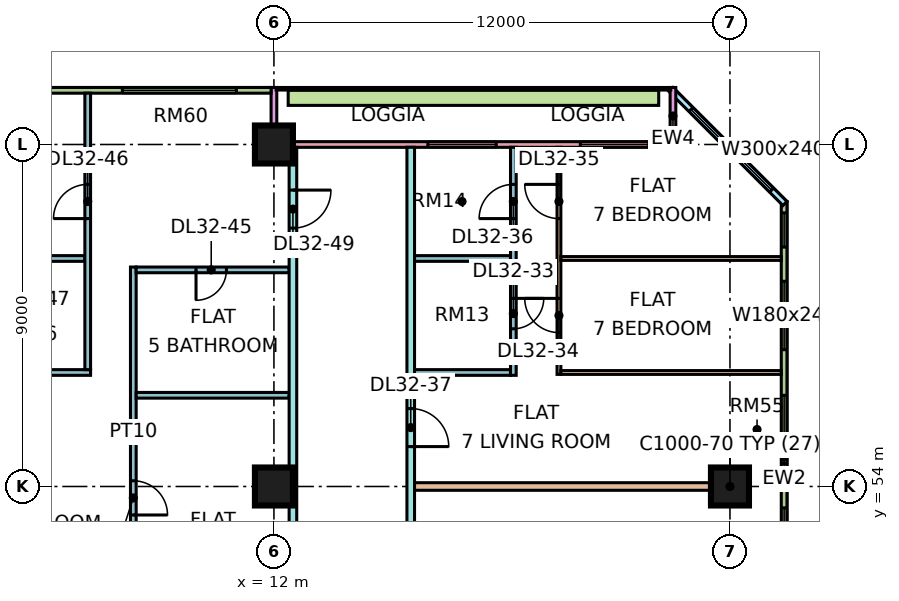
"""IFC4 building model, lengths in metres.
Left out: names, types, materials, properties, quantities, classifications, styles, units other than length and angle.
Written with IfcOpenShell. Run it as: python <this file> out.ifc"""

import sys

from ifc_helpers import new_model, si_unit, direction, frame, frame_2d, origin, origin_2d, place, context, subcontext, project, spatial, rectangle, extrude, element, fill, save


model = new_model("IFC4")
c1 = context("Model", 3, precision=1e-05, world=origin(), true_north=direction((0.0, 1.0)))
c2 = subcontext(c1, "Body", "Model", "MODEL_VIEW")
j1 = project(units=[si_unit("LENGTHUNIT", "METRE"), si_unit("PLANEANGLEUNIT", "RADIAN")], contexts=[c1])
p1 = place(None, origin())
s1 = spatial("IfcSite", under=j1, at=p1, CompositionType="ELEMENT")
p2 = place(p1, origin())
s2 = spatial("IfcBuilding", under=s1, at=p2, CompositionType="ELEMENT")
p3 = place(p2, frame((0.0, 0.0, 136.9)))
s3 = spatial("IfcBuildingStorey", under=s2, at=p3, CompositionType="ELEMENT", Elevation=136.9)
for number, where, z_axis, x_axis in (
    (1, (12.0, 54.0, 0.0), (0.0, 0.0, 1.0), (1.0, 0.0, 0.0)),
    (2, (12.0, 63.0, 0.0), (0.0, 0.0, 1.0), (1.0, 0.0, 0.0)),
    (3, (24.0, 54.0, 0.0), (0.0, 0.0, 1.0), (1.0, 0.0, 0.0)),
):
    element("IfcColumn", number, at=place(p3, frame(where, z_axis=z_axis, x_axis=x_axis)), inside=s3, PredefinedType="COLUMN", context=c2, shape_type="SweptSolid", body=[
        extrude(rectangle(XDim=1.0, YDim=1.0, at=origin_2d()), origin(), (0.0, 0.0, 1.0), 3.75),
    ])
p4 = place(p3, frame((25.425, 48.075, 0.0), z_axis=(0.0, 0.0, 1.0), x_axis=(0.0, 1.0, 0.0)))
e4 = element("IfcWall", 4, at=p4, inside=s3, PredefinedType="SOLIDWALL", context=c2, shape_type="SweptSolid", body=[
    extrude(rectangle(XDim=13.425, YDim=0.15, at=frame_2d((6.712, 0.0))), origin(), (0.0, 0.0, 1.0), 3.3),
])
p5 = place(p4, frame((0.562, 0.0, 0.45)))
e5 = element("IfcOpeningElement", 5, at=p5, cuts=e4, PredefinedType="OPENING", context=c2, shape_type="SweptSolid", body=[
    extrude(rectangle(XDim=4.8, YDim=2.4, at=frame_2d((2.4, 1.2))), frame((0.0, 0.085, 0.0), z_axis=(0.0, -1.0, 0.0), x_axis=(1.0, 0.0, 0.0)), (0.0, 0.0, 1.0), 0.17),
])
p6 = place(p4, frame((6.525, 0.0, 0.45)))
e6 = element("IfcOpeningElement", 6, at=p6, cuts=e4, PredefinedType="OPENING", context=c2, shape_type="SweptSolid", body=[
    extrude(rectangle(XDim=1.8, YDim=2.4, at=frame_2d((0.9, 1.2))), frame((0.0, 0.085, 0.0), z_axis=(0.0, -1.0, 0.0), x_axis=(1.0, 0.0, 0.0)), (0.0, 0.0, 1.0), 0.17),
])
p7 = place(p4, frame((9.525, 0.0, 0.45)))
e7 = element("IfcOpeningElement", 7, at=p7, cuts=e4, PredefinedType="OPENING", context=c2, shape_type="SweptSolid", body=[
    extrude(rectangle(XDim=1.8, YDim=2.4, at=frame_2d((0.9, 1.2))), frame((0.0, 0.085, 0.0), z_axis=(0.0, -1.0, 0.0), x_axis=(1.0, 0.0, 0.0)), (0.0, 0.0, 1.0), 0.17),
])
p8 = place(p4, frame((12.225, 0.0, 0.45)))
e8 = element("IfcOpeningElement", 8, at=p8, cuts=e4, PredefinedType="OPENING", context=c2, shape_type="SweptSolid", body=[
    extrude(rectangle(XDim=0.9, YDim=2.4, at=frame_2d((0.45, 1.2))), frame((0.0, 0.085, 0.0), z_axis=(0.0, -1.0, 0.0), x_axis=(1.0, 0.0, 0.0)), (0.0, 0.0, 1.0), 0.17),
])
p9 = place(p3, frame((25.447, 61.447, 0.0), z_axis=(0.0, 0.0, 1.0), x_axis=(-0.707106781187, 0.707106781187, 0.0)))
e9 = element("IfcWall", 9, at=p9, inside=s3, PredefinedType="SOLIDWALL", context=c2, shape_type="SweptSolid", body=[
    extrude(rectangle(XDim=4.243, YDim=0.15, at=frame_2d((2.121, 0.0))), origin(), (0.0, 0.0, 1.0), 3.3),
])
p10 = place(p9, frame((0.498, 0.0, 0.45)))
e10 = element("IfcOpeningElement", 10, at=p10, cuts=e9, PredefinedType="OPENING", context=c2, shape_type="SweptSolid", body=[
    extrude(rectangle(XDim=3.0, YDim=2.4, at=frame_2d((1.5, 1.2))), frame((0.0, 0.085, 0.0), z_axis=(0.0, -1.0, 0.0), x_axis=(1.0, 0.0, 0.0)), (0.0, 0.0, 1.0), 0.17),
])
p11 = place(p3, frame((22.425, 63.0, 0.0), z_axis=(0.0, 0.0, 1.0), x_axis=(-1.0, 0.0, 0.0)))
e11 = element("IfcWall", 11, at=p11, inside=s3, PredefinedType="SOLIDWALL", context=c2, shape_type="SweptSolid", body=[
    extrude(rectangle(XDim=10.35, YDim=0.15, at=frame_2d((5.175, 0.0))), origin(), (0.0, 0.0, 1.0), 3.3),
])
p12 = place(p11, frame((0.562, 0.0, 0.45)))
e12 = element("IfcOpeningElement", 12, at=p12, cuts=e11, PredefinedType="OPENING", context=c2, shape_type="SweptSolid", body=[
    extrude(rectangle(XDim=1.8, YDim=2.4, at=frame_2d((0.9, 1.2))), frame((0.0, 0.085, 0.0), z_axis=(0.0, -1.0, 0.0), x_axis=(1.0, 0.0, 0.0)), (0.0, 0.0, 1.0), 0.17),
])
p13 = place(p11, frame((4.575, 0.0, 0.45)))
e13 = element("IfcOpeningElement", 13, at=p13, cuts=e11, PredefinedType="OPENING", context=c2, shape_type="SweptSolid", body=[
    extrude(rectangle(XDim=1.8, YDim=2.4, at=frame_2d((0.9, 1.2))), frame((0.0, 0.085, 0.0), z_axis=(0.0, -1.0, 0.0), x_axis=(1.0, 0.0, 0.0)), (0.0, 0.0, 1.0), 0.17),
])
for number, where, z_axis, x_axis in (
    (14, (22.5, 64.5, 0.0), (0.0, 0.0, 1.0), (0.0, -1.0, 0.0)),
    (15, (12.0, 64.5, 0.0), (0.0, 0.0, 1.0), (0.0, -1.0, 0.0)),
):
    element("IfcWall", number, at=place(p3, frame(where, z_axis=z_axis, x_axis=x_axis)), inside=s3, PredefinedType="SOLIDWALL", context=c2, shape_type="SweptSolid", body=[
        extrude(rectangle(XDim=1.5, YDim=0.15, at=frame_2d((0.75, 0.0))), origin(), (0.0, 0.0, 1.0), 3.3),
    ])
p14 = place(p3, frame((11.925, 64.425, 0.0), z_axis=(0.0, 0.0, 1.0), x_axis=(-1.0, 0.0, 0.0)))
e16 = element("IfcWall", 16, at=p14, inside=s3, PredefinedType="SOLIDWALL", context=c2, shape_type="SweptSolid", body=[
    extrude(rectangle(XDim=10.425, YDim=0.15, at=frame_2d((5.212, 0.0))), origin(), (0.0, 0.0, 1.0), 3.3),
])
p15 = place(p14, frame((0.913, 0.0, 0.45)))
e17 = element("IfcOpeningElement", 17, at=p15, cuts=e16, PredefinedType="OPENING", context=c2, shape_type="SweptSolid", body=[
    extrude(rectangle(XDim=3.0, YDim=2.4, at=frame_2d((1.5, 1.2))), frame((0.0, 0.085, 0.0), z_axis=(0.0, -1.0, 0.0), x_axis=(1.0, 0.0, 0.0)), (0.0, 0.0, 1.0), 0.17),
])
p16 = place(p14, frame((6.125, 0.0, 0.45)))
e18 = element("IfcOpeningElement", 18, at=p16, cuts=e16, PredefinedType="OPENING", context=c2, shape_type="SweptSolid", body=[
    extrude(rectangle(XDim=3.0, YDim=2.4, at=frame_2d((1.5, 1.2))), frame((0.0, 0.085, 0.0), z_axis=(0.0, -1.0, 0.0), x_axis=(1.0, 0.0, 0.0)), (0.0, 0.0, 1.0), 0.17),
])
p17 = place(p3, frame((22.125, 64.229, 0.0), z_axis=(0.0, 0.0, 1.0), x_axis=(-1.0, 0.0, 0.0)))
e19 = element("IfcWall", 19, at=p17, inside=s3, PredefinedType="SOLIDWALL", context=c2, shape_type="SweptSolid", body=[
    extrude(rectangle(XDim=9.75, YDim=0.4, at=frame_2d((4.875, 0.0))), origin(), (0.0, 0.0, 1.0), 0.7),
])
p18 = place(p3, frame((-1.35, 57.0, 0.0), z_axis=(0.0, 0.0, 1.0), x_axis=(1.0, 0.0, 0.0)))
e20 = element("IfcWall", 20, at=p18, inside=s3, PredefinedType="PARTITIONING", context=c2, shape_type="SweptSolid", body=[
    extrude(rectangle(XDim=8.525, YDim=0.15, at=frame_2d((4.263, 0.0))), origin(), (0.0, 0.0, 1.0), 3.3),
])
p19 = place(p3, frame((4.175, 60.0, 0.0), z_axis=(0.0, 0.0, 1.0), x_axis=(1.0, 0.0, 0.0)))
e21 = element("IfcWall", 21, at=p19, inside=s3, PredefinedType="PARTITIONING", context=c2, shape_type="SweptSolid", body=[
    extrude(rectangle(XDim=2.85, YDim=0.15, at=frame_2d((1.425, 0.0))), origin(), (0.0, 0.0, 1.0), 3.3),
])
p20 = place(p19, frame((0.975, 0.0, 0.0)))
e22 = element("IfcOpeningElement", 22, at=p20, cuts=e21, PredefinedType="OPENING", context=c2, shape_type="SweptSolid", body=[
    extrude(rectangle(XDim=0.8, YDim=2.1, at=frame_2d((0.4, 1.05))), frame((0.0, 0.085, 0.0), z_axis=(0.0, -1.0, 0.0), x_axis=(1.0, 0.0, 0.0)), (0.0, 0.0, 1.0), 0.17),
])
p21 = place(p3, frame((7.1, 57.075, 0.0), z_axis=(0.0, 0.0, 1.0), x_axis=(0.0, 1.0, 0.0)))
e23 = element("IfcWall", 23, at=p21, inside=s3, PredefinedType="PARTITIONING", context=c2, shape_type="SweptSolid", body=[
    extrude(rectangle(XDim=7.275, YDim=0.15, at=frame_2d((3.638, 0.0))), origin(), (0.0, 0.0, 1.0), 3.3),
])
p22 = place(p21, frame((3.975, 0.0, 0.0)))
e24 = element("IfcOpeningElement", 24, at=p22, cuts=e23, PredefinedType="OPENING", context=c2, shape_type="SweptSolid", body=[
    extrude(rectangle(XDim=0.9, YDim=2.1, at=frame_2d((0.45, 1.05))), frame((0.0, 0.085, 0.0), z_axis=(0.0, -1.0, 0.0), x_axis=(1.0, 0.0, 0.0)), (0.0, 0.0, 1.0), 0.17),
])
p23 = place(p3, frame((8.3, 51.1, 0.0), z_axis=(0.0, 0.0, 1.0), x_axis=(0.0, 1.0, 0.0)))
e25 = element("IfcWall", 25, at=p23, inside=s3, PredefinedType="PARTITIONING", context=c2, shape_type="SweptSolid", body=[
    extrude(rectangle(XDim=8.675, YDim=0.15, at=frame_2d((4.337, 0.0))), origin(), (0.0, 0.0, 1.0), 3.3),
])
p24 = place(p23, frame((2.15, 0.0, 0.0)))
e26 = element("IfcOpeningElement", 26, at=p24, cuts=e25, PredefinedType="OPENING", context=c2, shape_type="SweptSolid", body=[
    extrude(rectangle(XDim=0.9, YDim=2.1, at=frame_2d((0.45, 1.05))), frame((0.0, 0.085, 0.0), z_axis=(0.0, -1.0, 0.0), x_axis=(1.0, 0.0, 0.0)), (0.0, 0.0, 1.0), 0.17),
])
p25 = place(p3, frame((8.375, 56.4, 0.0), z_axis=(0.0, 0.0, 1.0), x_axis=(1.0, 0.0, 0.0)))
e27 = element("IfcWall", 27, at=p25, inside=s3, PredefinedType="PARTITIONING", context=c2, shape_type="SweptSolid", body=[
    extrude(rectangle(XDim=4.025, YDim=0.15, at=frame_2d((2.012, 0.0))), origin(), (0.0, 0.0, 1.0), 3.3),
])
p26 = place(p3, frame((8.375, 59.7, 0.0), z_axis=(0.0, 0.0, 1.0), x_axis=(1.0, 0.0, 0.0)))
e28 = element("IfcWall", 28, at=p26, inside=s3, PredefinedType="PARTITIONING", context=c2, shape_type="SweptSolid", body=[
    extrude(rectangle(XDim=4.025, YDim=0.15, at=frame_2d((2.012, 0.0))), origin(), (0.0, 0.0, 1.0), 3.3),
])
p27 = place(p26, frame((1.575, 0.0, 0.0)))
e29 = element("IfcOpeningElement", 29, at=p27, cuts=e28, PredefinedType="OPENING", context=c2, shape_type="SweptSolid", body=[
    extrude(rectangle(XDim=0.8, YDim=2.1, at=frame_2d((0.4, 1.05))), frame((0.0, 0.085, 0.0), z_axis=(0.0, -1.0, 0.0), x_axis=(1.0, 0.0, 0.0)), (0.0, 0.0, 1.0), 0.17),
])
p28 = place(p3, frame((12.5, 20.0, 0.0), z_axis=(0.0, 0.0, 1.0), x_axis=(0.0, 1.0, 0.0)))
e30 = element("IfcWall", 30, at=p28, inside=s3, PredefinedType="PARTITIONING", context=c2, shape_type="SweptSolid", body=[
    extrude(rectangle(XDim=42.926, YDim=0.2, at=frame_2d((21.463, 0.0))), origin(), (0.0, 0.0, 1.0), 3.3),
])
p29 = place(p28, frame((17.25, 0.0, 0.0)))
e31 = element("IfcOpeningElement", 31, at=p29, cuts=e30, PredefinedType="OPENING", context=c2, shape_type="SweptSolid", body=[
    extrude(rectangle(XDim=1.0, YDim=2.1, at=frame_2d((0.5, 1.05))), frame((0.0, 0.11, 0.0), z_axis=(0.0, -1.0, 0.0), x_axis=(1.0, 0.0, 0.0)), (0.0, 0.0, 1.0), 0.22),
])
p30 = place(p28, frame((40.8, 0.0, 0.0)))
e32 = element("IfcOpeningElement", 32, at=p30, cuts=e30, PredefinedType="OPENING", context=c2, shape_type="SweptSolid", body=[
    extrude(rectangle(XDim=1.0, YDim=2.1, at=frame_2d((0.5, 1.05))), frame((0.0, 0.11, 0.0), z_axis=(0.0, -1.0, 0.0), x_axis=(1.0, 0.0, 0.0)), (0.0, 0.0, 1.0), 0.22),
])
p31 = place(p28, frame((0.6, 0.0, 0.0)))
e33 = element("IfcOpeningElement", 33, at=p31, cuts=e30, PredefinedType="OPENING", context=c2, shape_type="SweptSolid", body=[
    extrude(rectangle(XDim=1.2, YDim=2.1, at=frame_2d((0.6, 1.05))), frame((0.0, 0.11, 0.0), z_axis=(0.0, -1.0, 0.0), x_axis=(1.0, 0.0, 0.0)), (0.0, 0.0, 1.0), 0.22),
])
p32 = place(p28, frame((13.65, 0.0, 0.0)))
e34 = element("IfcOpeningElement", 34, at=p32, cuts=e30, PredefinedType="OPENING", context=c2, shape_type="SweptSolid", body=[
    extrude(rectangle(XDim=1.0, YDim=2.1, at=frame_2d((0.5, 1.05))), frame((0.0, 0.11, 0.0), z_axis=(0.0, -1.0, 0.0), x_axis=(1.0, 0.0, 0.0)), (0.0, 0.0, 1.0), 0.22),
])
p33 = place(p3, frame((15.6, 51.225, 0.0), z_axis=(0.0, 0.0, 1.0), x_axis=(0.0, 1.0, 0.0)))
e35 = element("IfcWall", 35, at=p33, inside=s3, PredefinedType="PARTITIONING", context=c2, shape_type="SweptSolid", body=[
    extrude(rectangle(XDim=11.701, YDim=0.2, at=frame_2d((5.851, 0.0))), origin(), (0.0, 0.0, 1.0), 3.3),
])
p34 = place(p33, frame((3.825, 0.0, 0.0)))
e36 = element("IfcOpeningElement", 36, at=p34, cuts=e35, PredefinedType="OPENING", context=c2, shape_type="SweptSolid", body=[
    extrude(rectangle(XDim=1.0, YDim=2.1, at=frame_2d((0.5, 1.05))), frame((0.0, 0.11, 0.0), z_axis=(0.0, -1.0, 0.0), x_axis=(1.0, 0.0, 0.0)), (0.0, 0.0, 1.0), 0.22),
])
p35 = place(p3, frame((15.7, 54.0, 0.0), z_axis=(0.0, 0.0, 1.0), x_axis=(1.0, 0.0, 0.0)))
e37 = element("IfcWall", 37, at=p35, inside=s3, PredefinedType="PARTITIONING", context=c2, shape_type="SweptSolid", body=[
    extrude(rectangle(XDim=8.3, YDim=0.2, at=frame_2d((4.15, 0.0))), origin(), (0.0, 0.0, 1.0), 3.3),
])
for number, where, z_axis, x_axis in (
    (38, (15.7, 57.0, 0.0), (0.0, 0.0, 1.0), (1.0, 0.0, 0.0)),
    (39, (15.7, 60.0, 0.0), (0.0, 0.0, 1.0), (1.0, 0.0, 0.0)),
):
    element("IfcWall", number, at=place(p3, frame(where, z_axis=z_axis, x_axis=x_axis)), inside=s3, PredefinedType="PARTITIONING", context=c2, shape_type="SweptSolid", body=[
        extrude(rectangle(XDim=2.525, YDim=0.15, at=frame_2d((1.263, 0.0))), origin(), (0.0, 0.0, 1.0), 3.3),
    ])
p36 = place(p3, frame((18.3, 56.925, 0.0), z_axis=(0.0, 0.0, 1.0), x_axis=(0.0, 1.0, 0.0)))
e40 = element("IfcWall", 40, at=p36, inside=s3, PredefinedType="PARTITIONING", context=c2, shape_type="SweptSolid", body=[
    extrude(rectangle(XDim=6.001, YDim=0.15, at=frame_2d((3.0, 0.0))), origin(), (0.0, 0.0, 1.0), 3.3),
])
p37 = place(p36, frame((1.225, 0.0, 0.0)))
e41 = element("IfcOpeningElement", 41, at=p37, cuts=e40, PredefinedType="OPENING", context=c2, shape_type="SweptSolid", body=[
    extrude(rectangle(XDim=0.8, YDim=2.1, at=frame_2d((0.4, 1.05))), frame((0.0, 0.085, 0.0), z_axis=(0.0, -1.0, 0.0), x_axis=(1.0, 0.0, 0.0)), (0.0, 0.0, 1.0), 0.17),
])
p38 = place(p36, frame((4.125, 0.0, 0.0)))
e42 = element("IfcOpeningElement", 42, at=p38, cuts=e40, PredefinedType="OPENING", context=c2, shape_type="SweptSolid", body=[
    extrude(rectangle(XDim=0.9, YDim=2.1, at=frame_2d((0.45, 1.05))), frame((0.0, 0.085, 0.0), z_axis=(0.0, -1.0, 0.0), x_axis=(1.0, 0.0, 0.0)), (0.0, 0.0, 1.0), 0.17),
])
p39 = place(p3, frame((19.5, 56.95, 0.0), z_axis=(0.0, 0.0, 1.0), x_axis=(0.0, 1.0, 0.0)))
e43 = element("IfcWall", 43, at=p39, inside=s3, PredefinedType="PARTITIONING", context=c2, shape_type="SweptSolid", body=[
    extrude(rectangle(XDim=5.976, YDim=0.1, at=frame_2d((2.988, 0.0))), origin(), (0.0, 0.0, 1.0), 3.3),
])
p40 = place(p39, frame((1.1, 0.0, 0.0)))
e44 = element("IfcOpeningElement", 44, at=p40, cuts=e43, PredefinedType="OPENING", context=c2, shape_type="SweptSolid", body=[
    extrude(rectangle(XDim=0.9, YDim=2.1, at=frame_2d((0.45, 1.05))), frame((0.0, 0.06, 0.0), z_axis=(0.0, -1.0, 0.0), x_axis=(1.0, 0.0, 0.0)), (0.0, 0.0, 1.0), 0.12),
])
p41 = place(p39, frame((4.1, 0.0, 0.0)))
e45 = element("IfcOpeningElement", 45, at=p41, cuts=e43, PredefinedType="OPENING", context=c2, shape_type="SweptSolid", body=[
    extrude(rectangle(XDim=0.9, YDim=2.1, at=frame_2d((0.45, 1.05))), frame((0.0, 0.06, 0.0), z_axis=(0.0, -1.0, 0.0), x_axis=(1.0, 0.0, 0.0)), (0.0, 0.0, 1.0), 0.12),
])
p42 = place(p3, frame((19.55, 57.0, 0.0), z_axis=(0.0, 0.0, 1.0), x_axis=(1.0, 0.0, 0.0)))
e46 = element("IfcWall", 46, at=p42, inside=s3, PredefinedType="PARTITIONING", context=c2, shape_type="SweptSolid", body=[
    extrude(rectangle(XDim=5.8, YDim=0.1, at=frame_2d((2.9, 0.0))), origin(), (0.0, 0.0, 1.0), 3.3),
])
p43 = place(p3, frame((19.55, 60.0, 0.0), z_axis=(0.0, 0.0, 1.0), x_axis=(1.0, 0.0, 0.0)))
e47 = element("IfcWall", 47, at=p43, inside=s3, PredefinedType="PARTITIONING", context=c2, shape_type="SweptSolid", body=[
    extrude(rectangle(XDim=5.801, YDim=0.1, at=frame_2d((2.9, 0.0))), origin(), (0.0, 0.0, 1.0), 3.3),
])
p44 = place(p5, origin())
e48 = element("IfcWindow", 48, at=p44, inside=s3, PartitioningType="SINGLE_PANEL", PredefinedType="WINDOW", context=c2, shape_type="SweptSolid", body=[
    extrude(rectangle(XDim=4.8, YDim=2.4, at=frame_2d((2.4, 1.2))), frame((0.0, 0.03, 0.0), z_axis=(0.0, -1.0, 0.0), x_axis=(1.0, 0.0, 0.0)), (0.0, 0.0, 1.0), 0.06),
])
fill(e5, e48)
p45 = place(p6, origin())
e49 = element("IfcWindow", 49, at=p45, inside=s3, PartitioningType="SINGLE_PANEL", PredefinedType="WINDOW", context=c2, shape_type="SweptSolid", body=[
    extrude(rectangle(XDim=1.8, YDim=2.4, at=frame_2d((0.9, 1.2))), frame((0.0, 0.03, 0.0), z_axis=(0.0, -1.0, 0.0), x_axis=(1.0, 0.0, 0.0)), (0.0, 0.0, 1.0), 0.06),
])
fill(e6, e49)
p46 = place(p7, origin())
e50 = element("IfcWindow", 50, at=p46, inside=s3, PartitioningType="SINGLE_PANEL", PredefinedType="WINDOW", context=c2, shape_type="SweptSolid", body=[
    extrude(rectangle(XDim=1.8, YDim=2.4, at=frame_2d((0.9, 1.2))), frame((0.0, 0.03, 0.0), z_axis=(0.0, -1.0, 0.0), x_axis=(1.0, 0.0, 0.0)), (0.0, 0.0, 1.0), 0.06),
])
fill(e7, e50)
p47 = place(p8, origin())
e51 = element("IfcWindow", 51, at=p47, inside=s3, PartitioningType="SINGLE_PANEL", PredefinedType="WINDOW", context=c2, shape_type="SweptSolid", body=[
    extrude(rectangle(XDim=0.9, YDim=2.4, at=frame_2d((0.45, 1.2))), frame((0.0, 0.03, 0.0), z_axis=(0.0, -1.0, 0.0), x_axis=(1.0, 0.0, 0.0)), (0.0, 0.0, 1.0), 0.06),
])
fill(e8, e51)
p48 = place(p10, origin())
e52 = element("IfcWindow", 52, at=p48, inside=s3, PartitioningType="SINGLE_PANEL", PredefinedType="WINDOW", context=c2, shape_type="SweptSolid", body=[
    extrude(rectangle(XDim=3.0, YDim=2.4, at=frame_2d((1.5, 1.2))), frame((0.0, 0.03, 0.0), z_axis=(0.0, -1.0, 0.0), x_axis=(1.0, 0.0, 0.0)), (0.0, 0.0, 1.0), 0.06),
])
fill(e10, e52)
p49 = place(p12, origin())
e53 = element("IfcWindow", 53, at=p49, inside=s3, PartitioningType="SINGLE_PANEL", PredefinedType="WINDOW", context=c2, shape_type="SweptSolid", body=[
    extrude(rectangle(XDim=1.8, YDim=2.4, at=frame_2d((0.9, 1.2))), frame((0.0, 0.03, 0.0), z_axis=(0.0, -1.0, 0.0), x_axis=(1.0, 0.0, 0.0)), (0.0, 0.0, 1.0), 0.06),
])
fill(e12, e53)
p50 = place(p13, origin())
e54 = element("IfcWindow", 54, at=p50, inside=s3, PartitioningType="SINGLE_PANEL", PredefinedType="WINDOW", context=c2, shape_type="SweptSolid", body=[
    extrude(rectangle(XDim=1.8, YDim=2.4, at=frame_2d((0.9, 1.2))), frame((0.0, 0.03, 0.0), z_axis=(0.0, -1.0, 0.0), x_axis=(1.0, 0.0, 0.0)), (0.0, 0.0, 1.0), 0.06),
])
fill(e13, e54)
p51 = place(p15, origin())
e55 = element("IfcWindow", 55, at=p51, inside=s3, PartitioningType="SINGLE_PANEL", PredefinedType="WINDOW", context=c2, shape_type="SweptSolid", body=[
    extrude(rectangle(XDim=3.0, YDim=2.4, at=frame_2d((1.5, 1.2))), frame((0.0, 0.03, 0.0), z_axis=(0.0, -1.0, 0.0), x_axis=(1.0, 0.0, 0.0)), (0.0, 0.0, 1.0), 0.06),
])
fill(e17, e55)
p52 = place(p37, origin())
e56 = element("IfcDoor", 56, at=p52, inside=s3, OperationType="SINGLE_SWING_RIGHT", PredefinedType="DOOR", context=c2, shape_type="SweptSolid", body=[
    extrude(rectangle(XDim=0.8, YDim=2.1, at=frame_2d((0.4, 1.05))), frame((0.0, 0.025, 0.0), z_axis=(0.0, -1.0, 0.0), x_axis=(1.0, 0.0, 0.0)), (0.0, 0.0, 1.0), 0.05),
])
fill(e41, e56)
p53 = place(p40, frame((0.9, 0.0, 0.0), z_axis=(0.0, 0.0, 1.0), x_axis=(-1.0, 0.0, 0.0)))
e57 = element("IfcDoor", 57, at=p53, inside=s3, OperationType="SINGLE_SWING_RIGHT", PredefinedType="DOOR", context=c2, shape_type="SweptSolid", body=[
    extrude(rectangle(XDim=0.9, YDim=2.1, at=frame_2d((0.45, 1.05))), frame((0.0, 0.025, 0.0), z_axis=(0.0, -1.0, 0.0), x_axis=(1.0, 0.0, 0.0)), (0.0, 0.0, 1.0), 0.05),
])
fill(e44, e57)
p54 = place(p41, frame((0.9, 0.0, 0.0), z_axis=(0.0, 0.0, 1.0), x_axis=(-1.0, 0.0, 0.0)))
e58 = element("IfcDoor", 58, at=p54, inside=s3, OperationType="SINGLE_SWING_RIGHT", PredefinedType="DOOR", context=c2, shape_type="SweptSolid", body=[
    extrude(rectangle(XDim=0.9, YDim=2.1, at=frame_2d((0.45, 1.05))), frame((0.0, 0.025, 0.0), z_axis=(0.0, -1.0, 0.0), x_axis=(1.0, 0.0, 0.0)), (0.0, 0.0, 1.0), 0.05),
])
fill(e45, e58)
p55 = place(p38, origin())
e59 = element("IfcDoor", 59, at=p55, inside=s3, OperationType="SINGLE_SWING_LEFT", PredefinedType="DOOR", context=c2, shape_type="SweptSolid", body=[
    extrude(rectangle(XDim=0.9, YDim=2.1, at=frame_2d((0.45, 1.05))), frame((0.0, 0.025, 0.0), z_axis=(0.0, -1.0, 0.0), x_axis=(1.0, 0.0, 0.0)), (0.0, 0.0, 1.0), 0.05),
])
fill(e42, e59)
p56 = place(p34, frame((1.0, 0.0, 0.0), z_axis=(0.0, 0.0, 1.0), x_axis=(-1.0, 0.0, 0.0)))
e60 = element("IfcDoor", 60, at=p56, inside=s3, OperationType="SINGLE_SWING_LEFT", PredefinedType="DOOR", context=c2, shape_type="SweptSolid", body=[
    extrude(rectangle(XDim=1.0, YDim=2.1, at=frame_2d((0.5, 1.05))), frame((0.0, 0.025, 0.0), z_axis=(0.0, -1.0, 0.0), x_axis=(1.0, 0.0, 0.0)), (0.0, 0.0, 1.0), 0.05),
])
fill(e36, e60)
p57 = place(p27, frame((0.8, 0.0, 0.0), z_axis=(0.0, 0.0, 1.0), x_axis=(-1.0, 0.0, 0.0)))
e61 = element("IfcDoor", 61, at=p57, inside=s3, OperationType="SINGLE_SWING_LEFT", PredefinedType="DOOR", context=c2, shape_type="SweptSolid", body=[
    extrude(rectangle(XDim=0.8, YDim=2.1, at=frame_2d((0.4, 1.05))), frame((0.0, 0.025, 0.0), z_axis=(0.0, -1.0, 0.0), x_axis=(1.0, 0.0, 0.0)), (0.0, 0.0, 1.0), 0.05),
])
fill(e29, e61)
p58 = place(p22, origin())
e62 = element("IfcDoor", 62, at=p58, inside=s3, OperationType="SINGLE_SWING_LEFT", PredefinedType="DOOR", context=c2, shape_type="SweptSolid", body=[
    extrude(rectangle(XDim=0.9, YDim=2.1, at=frame_2d((0.45, 1.05))), frame((0.0, 0.025, 0.0), z_axis=(0.0, -1.0, 0.0), x_axis=(1.0, 0.0, 0.0)), (0.0, 0.0, 1.0), 0.05),
])
fill(e24, e62)
p59 = place(p24, frame((0.9, 0.0, 0.0), z_axis=(0.0, 0.0, 1.0), x_axis=(-1.0, 0.0, 0.0)))
e63 = element("IfcDoor", 63, at=p59, inside=s3, OperationType="SINGLE_SWING_LEFT", PredefinedType="DOOR", context=c2, shape_type="SweptSolid", body=[
    extrude(rectangle(XDim=0.9, YDim=2.1, at=frame_2d((0.45, 1.05))), frame((0.0, 0.025, 0.0), z_axis=(0.0, -1.0, 0.0), x_axis=(1.0, 0.0, 0.0)), (0.0, 0.0, 1.0), 0.05),
])
fill(e26, e63)
p60 = place(p30, origin())
e64 = element("IfcDoor", 64, at=p60, inside=s3, OperationType="SINGLE_SWING_RIGHT", PredefinedType="DOOR", context=c2, shape_type="SweptSolid", body=[
    extrude(rectangle(XDim=1.0, YDim=2.1, at=frame_2d((0.5, 1.05))), frame((0.0, 0.025, 0.0), z_axis=(0.0, -1.0, 0.0), x_axis=(1.0, 0.0, 0.0)), (0.0, 0.0, 1.0), 0.05),
])
fill(e32, e64)
save(model, sys.argv[1])
